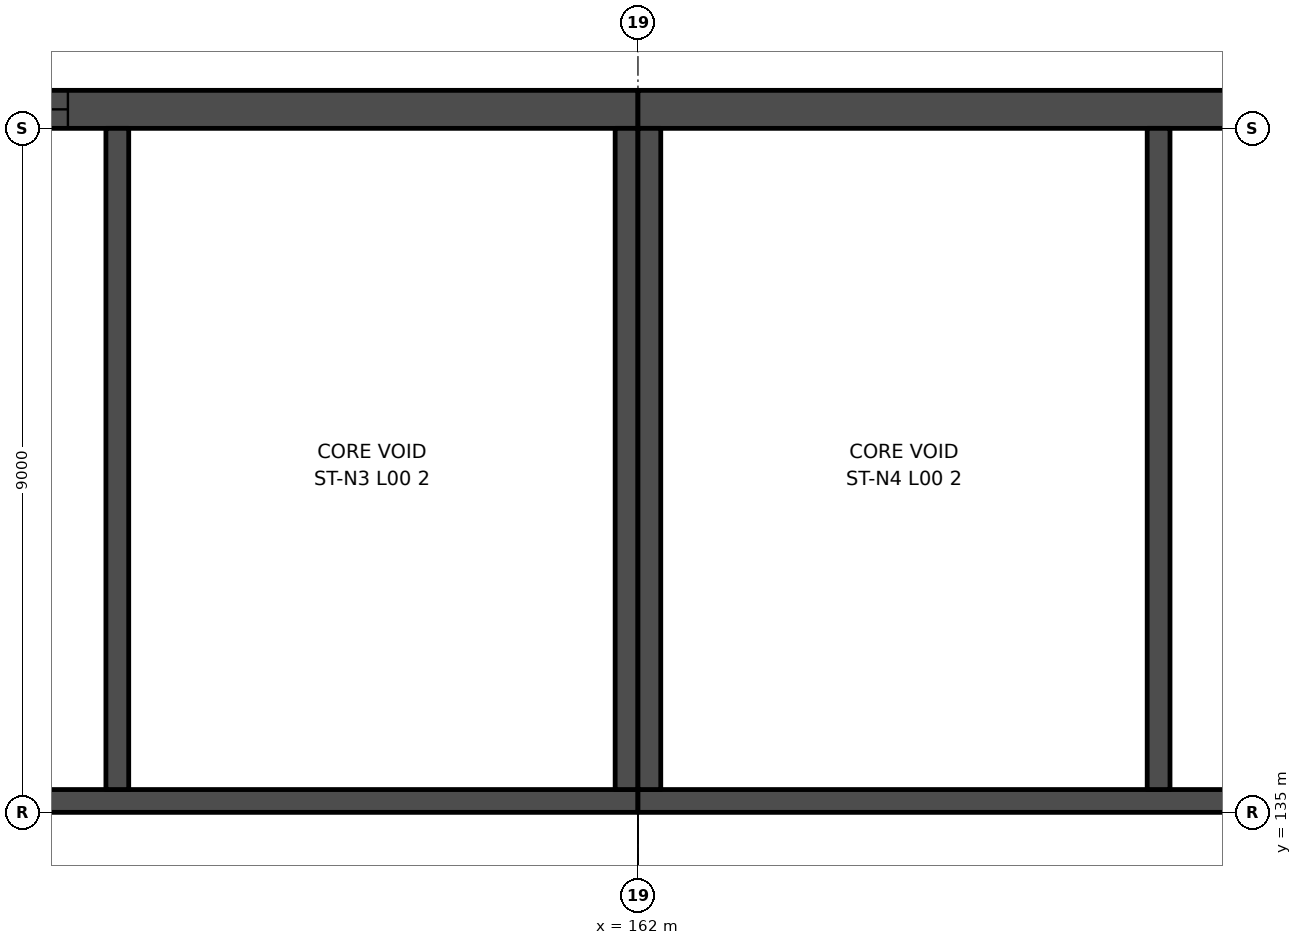
"""IFC4 building model, lengths in metres.
Left out: names, types, materials, properties, quantities, classifications, styles, units other than length and angle.
Written with IfcOpenShell. Run it as: python <this file> out.ifc"""

import sys

from ifc_helpers import new_model, si_unit, direction, frame, frame_2d, origin, place, context, subcontext, project, spatial, rectangle, extrude, element, fill, save


model = new_model("IFC4")
c1 = context("Model", 3, precision=1e-05, world=origin(), true_north=direction((0.0, 1.0)))
c2 = subcontext(c1, "Body", "Model", "MODEL_VIEW")
j1 = project(units=[si_unit("LENGTHUNIT", "METRE"), si_unit("PLANEANGLEUNIT", "RADIAN")], contexts=[c1])
p1 = place(None, origin())
s1 = spatial("IfcSite", under=j1, at=p1, CompositionType="ELEMENT")
p2 = place(p1, origin())
s2 = spatial("IfcBuilding", under=s1, at=p2, CompositionType="ELEMENT")
p3 = place(p2, origin())
s3 = spatial("IfcBuildingStorey", under=s2, at=p3, CompositionType="ELEMENT", Elevation=0.0)
p4 = place(p3, frame((144.0, 135.15, 0.0), z_axis=(0.0, 0.0, 1.0), x_axis=(1.0, 0.0, 0.0)))
e1 = element("IfcWall", 1, at=p4, inside=s3, PredefinedType="SHEAR", context=c2, shape_type="SweptSolid", body=[
    extrude(rectangle(XDim=18.0, YDim=0.3, at=frame_2d((9.0, 0.0))), origin(), (0.0, 0.0, 1.0), 7.0),
])
p5 = place(p4, frame((8.6, 0.0, 0.0)))
e2 = element("IfcOpeningElement", 2, at=p5, cuts=e1, PredefinedType="OPENING", context=c2, shape_type="SweptSolid", body=[
    extrude(rectangle(XDim=1.2, YDim=2.1, at=frame_2d((0.6, 1.05))), frame((0.0, 0.16, 0.0), z_axis=(0.0, -1.0, 0.0), x_axis=(1.0, 0.0, 0.0)), (0.0, 0.0, 1.0), 0.32),
])
p6 = place(p3, frame((144.0, 144.25, 0.0), z_axis=(0.0, 0.0, 1.0), x_axis=(1.0, 0.0, 0.0)))
e3 = element("IfcWall", 3, at=p6, inside=s3, PredefinedType="SHEAR", context=c2, shape_type="SweptSolid", body=[
    extrude(rectangle(XDim=18.0, YDim=0.5, at=frame_2d((9.0, 0.0))), origin(), (0.0, 0.0, 1.0), 7.0),
])
p7 = place(p6, frame((7.9, 0.0, 0.0)))
e4 = element("IfcOpeningElement", 4, at=p7, cuts=e3, PredefinedType="OPENING", context=c2, shape_type="SweptSolid", body=[
    extrude(rectangle(XDim=2.6, YDim=2.4, at=frame_2d((1.3, 1.2))), frame((0.0, 0.26, 0.0), z_axis=(0.0, -1.0, 0.0), x_axis=(1.0, 0.0, 0.0)), (0.0, 0.0, 1.0), 0.52),
])
for number, where, z_axis, x_axis in (
    (5, (161.85, 135.3, 0.0), (0.0, 0.0, 1.0), (0.0, 1.0, 0.0)),
    (6, (155.15, 135.3, 0.0), (0.0, 0.0, 1.0), (0.0, 1.0, 0.0)),
):
    element("IfcWall", number, at=place(p3, frame(where, z_axis=z_axis, x_axis=x_axis)), inside=s3, PredefinedType="SHEAR", context=c2, shape_type="SweptSolid", body=[
        extrude(rectangle(XDim=8.7, YDim=0.3, at=frame_2d((4.35, 0.0))), origin(), (0.0, 0.0, 1.0), 7.0),
    ])
p8 = place(p3, frame((180.0, 135.15, 0.0), z_axis=(0.0, 0.0, 1.0), x_axis=(-1.0, 0.0, 0.0)))
e7 = element("IfcWall", 7, at=p8, inside=s3, PredefinedType="SHEAR", context=c2, shape_type="SweptSolid", body=[
    extrude(rectangle(XDim=18.0, YDim=0.3, at=frame_2d((9.0, 0.0))), origin(), (0.0, 0.0, 1.0), 7.0),
])
p9 = place(p8, frame((1.5, 0.0, 0.0)))
e8 = element("IfcOpeningElement", 8, at=p9, cuts=e7, PredefinedType="OPENING", context=c2, shape_type="SweptSolid", body=[
    extrude(rectangle(XDim=1.2, YDim=2.1, at=frame_2d((0.6, 1.05))), frame((0.0, 0.16, 0.0), z_axis=(0.0, -1.0, 0.0), x_axis=(1.0, 0.0, 0.0)), (0.0, 0.0, 1.0), 0.32),
])
p10 = place(p3, frame((180.0, 144.25, 0.0), z_axis=(0.0, 0.0, 1.0), x_axis=(-1.0, 0.0, 0.0)))
e9 = element("IfcWall", 9, at=p10, inside=s3, PredefinedType="SHEAR", context=c2, shape_type="SweptSolid", body=[
    extrude(rectangle(XDim=18.0, YDim=0.5, at=frame_2d((9.0, 0.0))), origin(), (0.0, 0.0, 1.0), 7.0),
])
p11 = place(p10, frame((0.8, 0.0, 0.0)))
e10 = element("IfcOpeningElement", 10, at=p11, cuts=e9, PredefinedType="OPENING", context=c2, shape_type="SweptSolid", body=[
    extrude(rectangle(XDim=2.6, YDim=2.4, at=frame_2d((1.3, 1.2))), frame((0.0, 0.26, 0.0), z_axis=(0.0, -1.0, 0.0), x_axis=(1.0, 0.0, 0.0)), (0.0, 0.0, 1.0), 0.52),
])
for number, where, z_axis, x_axis in (
    (11, (162.15, 135.3, 0.0), (0.0, 0.0, 1.0), (0.0, 1.0, 0.0)),
    (12, (168.85, 135.3, 0.0), (0.0, 0.0, 1.0), (0.0, 1.0, 0.0)),
):
    element("IfcWall", number, at=place(p3, frame(where, z_axis=z_axis, x_axis=x_axis)), inside=s3, PredefinedType="SHEAR", context=c2, shape_type="SweptSolid", body=[
        extrude(rectangle(XDim=8.7, YDim=0.3, at=frame_2d((4.35, 0.0))), origin(), (0.0, 0.0, 1.0), 7.0),
    ])
p12 = place(p7, origin())
e13 = element("IfcDoor", 13, at=p12, inside=s3, OperationType="DOUBLE_DOOR_SINGLE_SWING", PredefinedType="DOOR", context=c2, shape_type="SweptSolid", body=[
    extrude(rectangle(XDim=2.6, YDim=2.4, at=frame_2d((1.3, 1.2))), frame((0.0, 0.025, 0.0), z_axis=(0.0, -1.0, 0.0), x_axis=(1.0, 0.0, 0.0)), (0.0, 0.0, 1.0), 0.05),
])
fill(e4, e13)
save(model, sys.argv[1])
